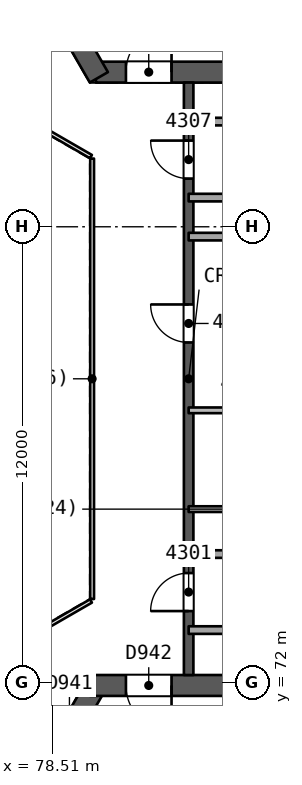
"""IFC4 building model, lengths in metres.
Left out: names, types, materials, properties, quantities, classifications, styles, units other than length and angle.
Written with IfcOpenShell. Run it as: python <this file> out.ifc"""

import sys

from ifc_helpers import new_model, si_unit, direction, frame, frame_2d, origin, place, context, subcontext, project, spatial, rectangle, extrude, element, fill, save


model = new_model("IFC4")
c1 = context("Model", 3, precision=1e-05, world=origin(), true_north=direction((0.0, 1.0)))
c2 = subcontext(c1, "Body", "Model", "MODEL_VIEW")
j1 = project(units=[si_unit("LENGTHUNIT", "METRE"), si_unit("PLANEANGLEUNIT", "RADIAN")], contexts=[c1])
p1 = place(None, origin())
s1 = spatial("IfcSite", under=j1, at=p1, CompositionType="ELEMENT")
p2 = place(p1, origin())
s2 = spatial("IfcBuilding", under=s1, at=p2, CompositionType="ELEMENT")
p3 = place(p2, frame((0.0, 0.0, 178.5)))
s3 = spatial("IfcBuildingStorey", under=s2, at=p3, CompositionType="ELEMENT", Elevation=178.5)
p4 = place(p3, frame((79.659, 88.069, 0.0), z_axis=(0.0, 0.0, 1.0), x_axis=(1.0, 0.0, 0.0)))
e1 = element("IfcWall", 1, at=p4, inside=s3, PredefinedType="SHEAR", context=c2, shape_type="SweptSolid", body=[
    extrude(rectangle(XDim=10.221, YDim=0.55, at=frame_2d((5.111, 0.0))), origin(), (0.0, 0.0, 1.0), 3.7),
])
p5 = place(p4, frame((0.791, 0.0, 0.0)))
e2 = element("IfcOpeningElement", 2, at=p5, cuts=e1, PredefinedType="OPENING", context=c2, shape_type="SweptSolid", body=[
    extrude(rectangle(XDim=1.2, YDim=2.1, at=frame_2d((0.6, 1.05))), frame((0.0, 0.286, 0.0), z_axis=(0.0, -1.0, 0.0), x_axis=(1.0, 0.0, 0.0)), (0.0, 0.0, 1.0), 0.571),
])
p6 = place(p3, frame((74.686, 96.683, 0.0), z_axis=(0.0, 0.0, 1.0), x_axis=(0.499997818338, -0.866026663364, 0.0)))
e3 = element("IfcWall", 3, at=p6, inside=s3, PredefinedType="SHEAR", context=c2, shape_type="SweptSolid", body=[
    extrude(rectangle(XDim=10.105, YDim=0.55, at=frame_2d((5.052, 0.0))), origin(), (0.0, 0.0, 1.0), 3.7),
])
p7 = place(p6, frame((7.955, 0.0, 0.0)))
e4 = element("IfcOpeningElement", 4, at=p7, cuts=e3, PredefinedType="OPENING", context=c2, shape_type="SweptSolid", body=[
    extrude(rectangle(XDim=1.2, YDim=2.1, at=frame_2d((0.6, 1.05))), frame((0.0, 0.286, 0.0), z_axis=(0.0, -1.0, 0.0), x_axis=(1.0, 0.0, 0.0)), (0.0, 0.0, 1.0), 0.571),
])
p8 = place(p3, frame((79.659, 71.931, 0.0), z_axis=(0.0, 0.0, 1.0), x_axis=(-0.500000202252, -0.866025287014, 0.0)))
e5 = element("IfcWall", 5, at=p8, inside=s3, PredefinedType="SHEAR", context=c2, shape_type="SweptSolid", body=[
    extrude(rectangle(XDim=10.221, YDim=0.55, at=frame_2d((5.111, 0.0))), origin(), (0.0, 0.0, 1.0), 3.7),
])
p9 = place(p8, frame((0.791, 0.0, 0.0)))
e6 = element("IfcOpeningElement", 6, at=p9, cuts=e5, PredefinedType="OPENING", context=c2, shape_type="SweptSolid", body=[
    extrude(rectangle(XDim=1.2, YDim=2.1, at=frame_2d((0.6, 1.05))), frame((0.0, 0.286, 0.0), z_axis=(0.0, -1.0, 0.0), x_axis=(1.0, 0.0, 0.0)), (0.0, 0.0, 1.0), 0.571),
])
p10 = place(p3, frame((89.605, 71.931, 0.0), z_axis=(0.0, 0.0, 1.0), x_axis=(-1.0, 0.0, 0.0)))
e7 = element("IfcWall", 7, at=p10, inside=s3, PredefinedType="SHEAR", context=c2, shape_type="SweptSolid", body=[
    extrude(rectangle(XDim=10.105, YDim=0.55, at=frame_2d((5.052, 0.0))), origin(), (0.0, 0.0, 1.0), 3.7),
])
p11 = place(p10, frame((7.955, 0.0, 0.0)))
e8 = element("IfcOpeningElement", 8, at=p11, cuts=e7, PredefinedType="OPENING", context=c2, shape_type="SweptSolid", body=[
    extrude(rectangle(XDim=1.2, YDim=2.1, at=frame_2d((0.6, 1.05))), frame((0.0, 0.286, 0.0), z_axis=(0.0, -1.0, 0.0), x_axis=(1.0, 0.0, 0.0)), (0.0, 0.0, 1.0), 0.571),
])
p12 = place(p3, frame((82.1, 72.206, 0.0), z_axis=(0.0, 0.0, 1.0), x_axis=(0.0, 1.0, 0.0)))
e9 = element("IfcWall", 9, at=p12, inside=s3, PredefinedType="SHEAR", context=c2, shape_type="SweptSolid", body=[
    extrude(rectangle(XDim=15.588, YDim=0.25, at=frame_2d((7.794, 0.0))), origin(), (0.0, 0.0, 1.0), 3.25),
])
p13 = place(p12, frame((1.682, 0.0, 0.0)))
e10 = element("IfcOpeningElement", 10, at=p13, cuts=e9, PredefinedType="OPENING", context=c2, shape_type="SweptSolid", body=[
    extrude(rectangle(XDim=1.0, YDim=2.1, at=frame_2d((0.5, 1.05))), frame((0.0, 0.135, 0.0), z_axis=(0.0, -1.0, 0.0), x_axis=(1.0, 0.0, 0.0)), (0.0, 0.0, 1.0), 0.271),
])
p14 = place(p12, frame((8.75, 0.0, 0.0)))
e11 = element("IfcOpeningElement", 11, at=p14, cuts=e9, PredefinedType="OPENING", context=c2, shape_type="SweptSolid", body=[
    extrude(rectangle(XDim=1.0, YDim=2.1, at=frame_2d((0.5, 1.05))), frame((0.0, 0.135, 0.0), z_axis=(0.0, -1.0, 0.0), x_axis=(1.0, 0.0, 0.0)), (0.0, 0.0, 1.0), 0.271),
])
p15 = place(p12, frame((13.062, 0.0, 0.0)))
e12 = element("IfcOpeningElement", 12, at=p15, cuts=e9, PredefinedType="OPENING", context=c2, shape_type="SweptSolid", body=[
    extrude(rectangle(XDim=1.0, YDim=2.1, at=frame_2d((0.5, 1.05))), frame((0.0, 0.135, 0.0), z_axis=(0.0, -1.0, 0.0), x_axis=(1.0, 0.0, 0.0)), (0.0, 0.0, 1.0), 0.271),
])
p16 = place(p3, frame((82.1, 75.388, 0.0), z_axis=(0.0, 0.0, 1.0), x_axis=(1.0, 0.0, 0.0)))
e13 = element("IfcWall", 13, at=p16, inside=s3, PredefinedType="PARTITIONING", context=c2, shape_type="SweptSolid", body=[
    extrude(rectangle(XDim=9.0, YDim=0.2, at=frame_2d((4.5, 0.0))), origin(), (0.0, 0.0, 1.0), 3.25),
])
p17 = place(p16, frame((4.05, 0.0, 0.0)))
e14 = element("IfcOpeningElement", 14, at=p17, cuts=e13, PredefinedType="OPENING", context=c2, shape_type="SweptSolid", body=[
    extrude(rectangle(XDim=0.9, YDim=2.1, at=frame_2d((0.45, 1.05))), frame((0.0, 0.11, 0.0), z_axis=(0.0, -1.0, 0.0), x_axis=(1.0, 0.0, 0.0)), (0.0, 0.0, 1.0), 0.221),
])
p18 = place(p3, frame((91.1, 73.388, 0.0), z_axis=(0.0, 0.0, 1.0), x_axis=(-1.0, 0.0, 0.0)))
e15 = element("IfcWall", 15, at=p18, inside=s3, PredefinedType="PARTITIONING", context=c2, shape_type="SweptSolid", body=[
    extrude(rectangle(XDim=9.0, YDim=0.2, at=frame_2d((4.5, 0.0))), origin(), (0.0, 0.0, 1.0), 3.25),
])
p19 = place(p3, frame((85.0, 76.571, 0.0), z_axis=(0.0, 0.0, 1.0), x_axis=(-1.0, 0.0, 0.0)))
e16 = element("IfcWall", 16, at=p19, inside=s3, PredefinedType="PARTITIONING", context=c2, shape_type="SweptSolid", body=[
    extrude(rectangle(XDim=2.9, YDim=0.15, at=frame_2d((1.45, 0.0))), origin(), (0.0, 0.0, 1.0), 3.25),
])
p20 = place(p3, frame((82.1, 79.171, 0.0), z_axis=(0.0, 0.0, 1.0), x_axis=(1.0, 0.0, 0.0)))
e17 = element("IfcWall", 17, at=p20, inside=s3, PredefinedType="PARTITIONING", context=c2, shape_type="SweptSolid", body=[
    extrude(rectangle(XDim=2.9, YDim=0.15, at=frame_2d((1.45, 0.0))), origin(), (0.0, 0.0, 1.0), 3.25),
])
p21 = place(p20, frame((1.05, 0.0, 0.0)))
e18 = element("IfcOpeningElement", 18, at=p21, cuts=e17, PredefinedType="OPENING", context=c2, shape_type="SweptSolid", body=[
    extrude(rectangle(XDim=0.8, YDim=2.1, at=frame_2d((0.4, 1.05))), frame((0.0, 0.085, 0.0), z_axis=(0.0, -1.0, 0.0), x_axis=(1.0, 0.0, 0.0)), (0.0, 0.0, 1.0), 0.171),
])
p22 = place(p3, frame((93.353, 83.741, 0.0), z_axis=(0.0, 0.0, 1.0), x_axis=(-1.0, 0.0, 0.0)))
e19 = element("IfcWall", 19, at=p22, inside=s3, PredefinedType="PARTITIONING", context=c2, shape_type="SweptSolid", body=[
    extrude(rectangle(XDim=11.253, YDim=0.2, at=frame_2d((5.626, 0.0))), origin(), (0.0, 0.0, 1.0), 3.25),
])
for number, where, z_axis, x_axis in (
    (20, (82.1, 86.768, 0.0), (0.0, 0.0, 1.0), (1.0, 0.0, 0.0)),
    (21, (91.1, 84.768, 0.0), (0.0, 0.0, 1.0), (-1.0, 0.0, 0.0)),
):
    element("IfcWall", number, at=place(p3, frame(where, z_axis=z_axis, x_axis=x_axis)), inside=s3, PredefinedType="PARTITIONING", context=c2, shape_type="SweptSolid", body=[
        extrude(rectangle(XDim=9.0, YDim=0.2, at=frame_2d((4.5, 0.0))), origin(), (0.0, 0.0, 1.0), 3.25),
    ])
p23 = place(p3, frame((42.71, 82.722, 0.0), z_axis=(0.0, 0.0, 1.0), x_axis=(0.866026647012, 0.499997846661, 0.0)))
e22 = element("IfcWall", 22, at=p23, inside=s3, PredefinedType="SOLIDWALL", context=c2, shape_type="SweptSolid", body=[
    extrude(rectangle(XDim=53.206, YDim=0.3, at=frame_2d((26.603, 0.0))), origin(), (0.0, 0.0, 1.0), 3.25),
])
p24 = place(p23, frame((30.391, 0.0, 0.0)))
e23 = element("IfcOpeningElement", 23, at=p24, cuts=e22, PredefinedType="OPENING", context=c2, shape_type="SweptSolid", body=[
    extrude(rectangle(XDim=2.4, YDim=2.4, at=frame_2d((1.2, 1.2))), frame((0.0, 0.161, 0.0), z_axis=(0.0, -1.0, 0.0), x_axis=(1.0, 0.0, 0.0)), (0.0, 0.0, 1.0), 0.321),
])
p25 = place(p23, frame((41.356, 0.0, 0.0)))
e24 = element("IfcOpeningElement", 24, at=p25, cuts=e22, PredefinedType="OPENING", context=c2, shape_type="SweptSolid", body=[
    extrude(rectangle(XDim=2.4, YDim=2.4, at=frame_2d((1.2, 1.2))), frame((0.0, 0.161, 0.0), z_axis=(0.0, -1.0, 0.0), x_axis=(1.0, 0.0, 0.0)), (0.0, 0.0, 1.0), 0.321),
])
p26 = place(p23, frame((19.635, 0.0, 0.0)))
e25 = element("IfcOpeningElement", 25, at=p26, cuts=e22, PredefinedType="OPENING", context=c2, shape_type="SweptSolid", body=[
    extrude(rectangle(XDim=2.4, YDim=2.4, at=frame_2d((1.2, 1.2))), frame((0.0, 0.161, 0.0), z_axis=(0.0, -1.0, 0.0), x_axis=(1.0, 0.0, 0.0)), (0.0, 0.0, 1.0), 0.321),
])
p27 = place(p23, frame((9.4, 0.0, 0.0)))
e26 = element("IfcOpeningElement", 26, at=p27, cuts=e22, PredefinedType="OPENING", context=c2, shape_type="SweptSolid", body=[
    extrude(rectangle(XDim=2.4, YDim=2.4, at=frame_2d((1.2, 1.2))), frame((0.0, 0.161, 0.0), z_axis=(0.0, -1.0, 0.0), x_axis=(1.0, 0.0, 0.0)), (0.0, 0.0, 1.0), 0.321),
])
p28 = place(p23, frame((26.404, 0.0, 0.9)))
e27 = element("IfcOpeningElement", 27, at=p28, cuts=e22, PredefinedType="OPENING", context=c2, shape_type="SweptSolid", body=[
    extrude(rectangle(XDim=1.8, YDim=1.5, at=frame_2d((0.9, 0.75))), frame((0.0, 0.161, 0.0), z_axis=(0.0, -1.0, 0.0), x_axis=(1.0, 0.0, 0.0)), (0.0, 0.0, 1.0), 0.321),
])
p29 = place(p23, frame((23.442, 0.0, 0.9)))
e28 = element("IfcOpeningElement", 28, at=p29, cuts=e22, PredefinedType="OPENING", context=c2, shape_type="SweptSolid", body=[
    extrude(rectangle(XDim=1.8, YDim=1.5, at=frame_2d((0.9, 0.75))), frame((0.0, 0.161, 0.0), z_axis=(0.0, -1.0, 0.0), x_axis=(1.0, 0.0, 0.0)), (0.0, 0.0, 1.0), 0.321),
])
p30 = place(p3, frame((88.788, 50.676, 0.0), z_axis=(0.0, 0.0, 1.0), x_axis=(-0.866026647012, 0.499997846661, 0.0)))
e29 = element("IfcWall", 29, at=p30, inside=s3, PredefinedType="SOLIDWALL", context=c2, shape_type="SweptSolid", body=[
    extrude(rectangle(XDim=53.206, YDim=0.3, at=frame_2d((26.603, 0.0))), origin(), (0.0, 0.0, 1.0), 3.25),
])
p31 = place(p30, frame((31.015, 0.0, 0.0)))
e30 = element("IfcOpeningElement", 30, at=p31, cuts=e29, PredefinedType="OPENING", context=c2, shape_type="SweptSolid", body=[
    extrude(rectangle(XDim=2.4, YDim=2.4, at=frame_2d((1.2, 1.2))), frame((0.0, 0.161, 0.0), z_axis=(0.0, -1.0, 0.0), x_axis=(1.0, 0.0, 0.0)), (0.0, 0.0, 1.0), 0.321),
])
p32 = place(p30, frame((41.356, 0.0, 0.0)))
e31 = element("IfcOpeningElement", 31, at=p32, cuts=e29, PredefinedType="OPENING", context=c2, shape_type="SweptSolid", body=[
    extrude(rectangle(XDim=2.4, YDim=2.4, at=frame_2d((1.2, 1.2))), frame((0.0, 0.161, 0.0), z_axis=(0.0, -1.0, 0.0), x_axis=(1.0, 0.0, 0.0)), (0.0, 0.0, 1.0), 0.321),
])
p33 = place(p30, frame((20.726, 0.0, 0.0)))
e32 = element("IfcOpeningElement", 32, at=p33, cuts=e29, PredefinedType="OPENING", context=c2, shape_type="SweptSolid", body=[
    extrude(rectangle(XDim=2.4, YDim=2.4, at=frame_2d((1.2, 1.2))), frame((0.0, 0.161, 0.0), z_axis=(0.0, -1.0, 0.0), x_axis=(1.0, 0.0, 0.0)), (0.0, 0.0, 1.0), 0.321),
])
p34 = place(p30, frame((9.4, 0.0, 0.0)))
e33 = element("IfcOpeningElement", 33, at=p34, cuts=e29, PredefinedType="OPENING", context=c2, shape_type="SweptSolid", body=[
    extrude(rectangle(XDim=2.4, YDim=2.4, at=frame_2d((1.2, 1.2))), frame((0.0, 0.161, 0.0), z_axis=(0.0, -1.0, 0.0), x_axis=(1.0, 0.0, 0.0)), (0.0, 0.0, 1.0), 0.321),
])
p35 = place(p30, frame((26.338, 0.0, 0.0)))
e34 = element("IfcOpeningElement", 34, at=p35, cuts=e29, PredefinedType="OPENING", context=c2, shape_type="SweptSolid", body=[
    extrude(rectangle(XDim=2.4, YDim=2.4, at=frame_2d((1.2, 1.2))), frame((0.0, 0.161, 0.0), z_axis=(0.0, -1.0, 0.0), x_axis=(1.0, 0.0, 0.0)), (0.0, 0.0, 1.0), 0.321),
])
p36 = place(p3, frame((79.56, 74.206, 0.0), z_axis=(0.0, 0.0, 1.0), x_axis=(0.0, 1.0, 0.0)))
e35 = element("IfcWall", 35, at=p36, inside=s3, PredefinedType="PARTITIONING", context=c2, shape_type="SweptSolid", body=[
    extrude(rectangle(XDim=11.588, YDim=0.1, at=frame_2d((5.794, 0.0))), origin(), (0.0, 0.0, 1.0), 3.25),
])
for number, where, z_axis, x_axis in (
    (36, (79.53, 85.846, 0.0), (0.0, 0.0, 1.0), (-0.866, 0.5, 0.0)),
    (37, (77.798, 73.154, 0.0), (0.0, 0.0, 1.0), (0.866, 0.5, 0.0)),
):
    element("IfcWall", number, at=place(p3, frame(where, z_axis=z_axis, x_axis=x_axis)), inside=s3, PredefinedType="PARTITIONING", context=c2, shape_type="SweptSolid", body=[
        extrude(rectangle(XDim=2.0, YDim=0.1, at=frame_2d((1.0, 0.0))), origin(), (0.0, 0.0, 1.0), 3.25),
    ])
p37 = place(p13, origin())
e38 = element("IfcDoor", 38, at=p37, inside=s3, OperationType="SINGLE_SWING_LEFT", PredefinedType="NOTDEFINED", context=c2, shape_type="SweptSolid", body=[
    extrude(rectangle(XDim=1.0, YDim=2.1, at=frame_2d((0.5, 1.05))), frame((0.0, 0.025, 0.0), z_axis=(0.0, -1.0, 0.0), x_axis=(1.0, 0.0, 0.0)), (0.0, 0.0, 1.0), 0.05),
])
fill(e10, e38)
p38 = place(p14, origin())
e39 = element("IfcDoor", 39, at=p38, inside=s3, OperationType="SINGLE_SWING_RIGHT", PredefinedType="NOTDEFINED", context=c2, shape_type="SweptSolid", body=[
    extrude(rectangle(XDim=1.0, YDim=2.1, at=frame_2d((0.5, 1.05))), frame((0.0, 0.025, 0.0), z_axis=(0.0, -1.0, 0.0), x_axis=(1.0, 0.0, 0.0)), (0.0, 0.0, 1.0), 0.05),
])
fill(e11, e39)
p39 = place(p15, origin())
e40 = element("IfcDoor", 40, at=p39, inside=s3, OperationType="SINGLE_SWING_RIGHT", PredefinedType="NOTDEFINED", context=c2, shape_type="SweptSolid", body=[
    extrude(rectangle(XDim=1.0, YDim=2.1, at=frame_2d((0.5, 1.05))), frame((0.0, 0.025, 0.0), z_axis=(0.0, -1.0, 0.0), x_axis=(1.0, 0.0, 0.0)), (0.0, 0.0, 1.0), 0.05),
])
fill(e12, e40)
p40 = place(p5, origin())
e41 = element("IfcDoor", 41, at=p40, inside=s3, OperationType="SINGLE_SWING_RIGHT", PredefinedType="NOTDEFINED", context=c2, shape_type="SweptSolid", body=[
    extrude(rectangle(XDim=1.2, YDim=2.1, at=frame_2d((0.6, 1.05))), frame((0.0, 0.025, 0.0), z_axis=(0.0, -1.0, 0.0), x_axis=(1.0, 0.0, 0.0)), (0.0, 0.0, 1.0), 0.05),
])
fill(e2, e41)
p41 = place(p11, origin())
e42 = element("IfcDoor", 42, at=p41, inside=s3, OperationType="SINGLE_SWING_LEFT", PredefinedType="NOTDEFINED", context=c2, shape_type="SweptSolid", body=[
    extrude(rectangle(XDim=1.2, YDim=2.1, at=frame_2d((0.6, 1.05))), frame((0.0, 0.025, 0.0), z_axis=(0.0, -1.0, 0.0), x_axis=(1.0, 0.0, 0.0)), (0.0, 0.0, 1.0), 0.05),
])
fill(e8, e42)
save(model, sys.argv[1])
